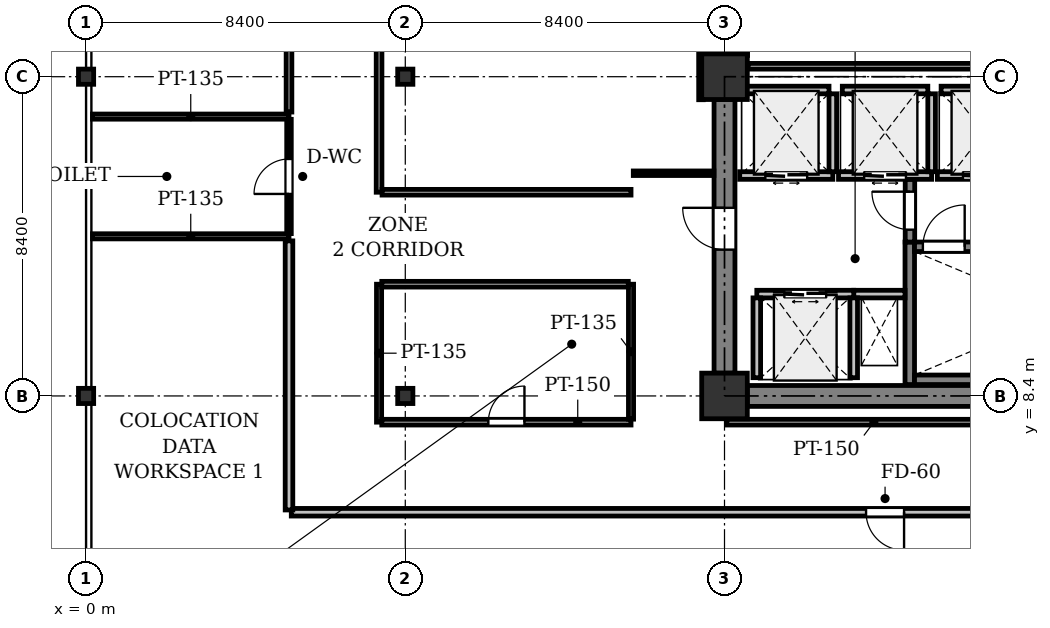
"""IFC4 building model, lengths in metres.
Left out: names, types, materials, properties, quantities, classifications, styles, units other than length and angle.
Written with IfcOpenShell. Run it as: python <this file> out.ifc"""

import sys

from ifc_helpers import new_model, si_unit, direction, frame, frame_2d, origin, origin_2d, place, context, subcontext, project, spatial, rectangle, i_section, extrude, element, fill, save


model = new_model("IFC4")
c1 = context("Model", 3, precision=1e-05, world=origin(), true_north=direction((0.0, 1.0)))
c2 = subcontext(c1, "Body", "Model", "MODEL_VIEW")
j1 = project(units=[si_unit("LENGTHUNIT", "METRE"), si_unit("PLANEANGLEUNIT", "RADIAN")], contexts=[c1])
p1 = place(None, origin())
s1 = spatial("IfcSite", under=j1, at=p1, CompositionType="ELEMENT")
p2 = place(p1, origin())
s2 = spatial("IfcBuilding", under=s1, at=p2, CompositionType="ELEMENT")
p3 = place(p2, frame((0.0, 0.0, 129.5)))
s3 = spatial("IfcBuildingStorey", under=s2, at=p3, CompositionType="ELEMENT", Elevation=129.5)
for number, where, z_axis, x_axis in (
    (1, (0.0, 8.4, 0.0), (0.0, 0.0, 1.0), (1.0, 0.0, 0.0)),
    (2, (0.0, 16.8, 0.0), (0.0, 0.0, 1.0), (1.0, 0.0, 0.0)),
    (3, (8.4, 8.4, 0.0), (0.0, 0.0, 1.0), (1.0, 0.0, 0.0)),
    (4, (8.4, 16.8, 0.0), (0.0, 0.0, 1.0), (1.0, 0.0, 0.0)),
):
    element("IfcColumn", number, at=place(p3, frame(where, z_axis=z_axis, x_axis=x_axis)), inside=s3, PredefinedType="COLUMN", context=c2, shape_type="SweptSolid", body=[
        extrude(i_section(OverallWidth=0.4, OverallDepth=0.4, WebThickness=0.025, FlangeThickness=0.04, at=origin_2d()), origin(), (0.0, 0.0, 1.0), 4.1),
    ])
for number, where, z_axis, x_axis in (
    (5, (16.8, 8.4, 0.0), (0.0, 0.0, 1.0), (1.0, 0.0, 0.0)),
    (6, (16.8, 16.8, 0.0), (0.0, 0.0, 1.0), (1.0, 0.0, 0.0)),
):
    element("IfcColumn", number, at=place(p3, frame(where, z_axis=z_axis, x_axis=x_axis)), inside=s3, PredefinedType="COLUMN", context=c2, shape_type="SweptSolid", body=[
        extrude(rectangle(XDim=1.2, YDim=1.2, at=origin_2d()), origin(), (0.0, 0.0, 1.0), 4.1),
    ])
p4 = place(p3, frame((17.4, 8.4, 0.0), z_axis=(0.0, 0.0, 1.0), x_axis=(1.0, 0.0, 0.0)))
e7 = element("IfcWall", 7, at=p4, inside=s3, PredefinedType="SHEAR", context=c2, shape_type="SweptSolid", body=[
    extrude(rectangle(XDim=7.2, YDim=0.55, at=frame_2d((3.6, 0.0))), origin(), (0.0, 0.0, 1.0), 3.825),
])
p5 = place(p3, frame((16.8, 9.0, 0.0), z_axis=(0.0, 0.0, 1.0), x_axis=(0.0, 1.0, 0.0)))
e8 = element("IfcWall", 8, at=p5, inside=s3, PredefinedType="SHEAR", context=c2, shape_type="SweptSolid", body=[
    extrude(rectangle(XDim=7.2, YDim=0.55, at=frame_2d((3.6, 0.0))), origin(), (0.0, 0.0, 1.0), 3.825),
])
p6 = place(p5, frame((3.25, 0.0, 0.0)))
e9 = element("IfcOpeningElement", 9, at=p6, cuts=e8, PredefinedType="OPENING", context=c2, shape_type="SweptSolid", body=[
    extrude(rectangle(XDim=1.1, YDim=2.15, at=frame_2d((0.55, 1.075))), frame((0.0, 0.285, 0.0), z_axis=(0.0, -1.0, 0.0), x_axis=(1.0, 0.0, 0.0)), (0.0, 0.0, 1.0), 0.57),
])
p7 = place(p3, frame((21.675, 8.7, 0.0), z_axis=(0.0, 0.0, 1.0), x_axis=(0.0, 1.0, 0.0)))
e10 = element("IfcWall", 10, at=p7, inside=s3, PredefinedType="SHEAR", context=c2, shape_type="SweptSolid", body=[
    extrude(rectangle(XDim=3.75, YDim=0.25, at=frame_2d((1.875, 0.0))), origin(), (0.0, 0.0, 1.0), 3.825),
])
p8 = place(p3, frame((21.8, 8.825, 0.0), z_axis=(0.0, 0.0, 1.0), x_axis=(1.0, 0.0, 0.0)))
e11 = element("IfcWall", 11, at=p8, inside=s3, PredefinedType="SHEAR", context=c2, shape_type="SweptSolid", body=[
    extrude(rectangle(XDim=7.75, YDim=0.25, at=frame_2d((3.875, 0.0))), origin(), (0.0, 0.0, 1.0), 3.825),
])
p9 = place(p3, frame((21.8, 12.325, 0.0), z_axis=(0.0, 0.0, 1.0), x_axis=(1.0, 0.0, 0.0)))
e12 = element("IfcWall", 12, at=p9, inside=s3, PredefinedType="SHEAR", context=c2, shape_type="SweptSolid", body=[
    extrude(rectangle(XDim=7.75, YDim=0.25, at=frame_2d((3.875, 0.0))), origin(), (0.0, 0.0, 1.0), 3.825),
])
p10 = place(p9, frame((0.22, 0.0, 0.0)))
e13 = element("IfcOpeningElement", 13, at=p10, cuts=e12, PredefinedType="OPENING", context=c2, shape_type="SweptSolid", body=[
    extrude(rectangle(XDim=1.1, YDim=2.15, at=frame_2d((0.55, 1.075))), frame((0.0, 0.135, 0.0), z_axis=(0.0, -1.0, 0.0), x_axis=(1.0, 0.0, 0.0)), (0.0, 0.0, 1.0), 0.27),
])
p11 = place(p3, frame((20.2, 11.08, 0.0), z_axis=(0.0, 0.0, 1.0), x_axis=(1.0, 0.0, 0.0)))
e14 = element("IfcWall", 14, at=p11, inside=s3, PredefinedType="PARTITIONING", context=c2, shape_type="SweptSolid", body=[
    extrude(rectangle(XDim=1.35, YDim=0.2, at=frame_2d((0.675, 0.0))), origin(), (0.0, 0.0, 1.0), 3.825),
])
p12 = place(p3, frame((21.68, 12.45, 0.0), z_axis=(0.0, 0.0, 1.0), x_axis=(0.0, 1.0, 0.0)))
e15 = element("IfcWall", 15, at=p12, inside=s3, PredefinedType="SHEAR", context=c2, shape_type="SweptSolid", body=[
    extrude(rectangle(XDim=1.65, YDim=0.25, at=frame_2d((0.825, 0.0))), origin(), (0.0, 0.0, 1.0), 3.825),
])
p13 = place(p12, frame((0.325, 0.0, 0.0)))
e16 = element("IfcOpeningElement", 16, at=p13, cuts=e15, PredefinedType="OPENING", context=c2, shape_type="SweptSolid", body=[
    extrude(rectangle(XDim=1.0, YDim=2.15, at=frame_2d((0.5, 1.075))), frame((0.0, 0.135, 0.0), z_axis=(0.0, -1.0, 0.0), x_axis=(1.0, 0.0, 0.0)), (0.0, 0.0, 1.0), 0.27),
])
p14 = place(p3, frame((17.65, 11.08, 0.0), z_axis=(0.0, 0.0, 1.0), x_axis=(1.0, 0.0, 0.0)))
e17 = element("IfcWall", 17, at=p14, inside=s3, PredefinedType="PARTITIONING", context=c2, shape_type="SweptSolid", body=[
    extrude(rectangle(XDim=2.55, YDim=0.2, at=frame_2d((1.275, 0.0))), origin(), (0.0, 0.0, 1.0), 3.825),
])
p15 = place(p14, frame((0.725, 0.0, 0.0)))
e18 = element("IfcOpeningElement", 18, at=p15, cuts=e17, PredefinedType="OPENING", context=c2, shape_type="SweptSolid", body=[
    extrude(rectangle(XDim=1.1, YDim=2.2, at=frame_2d((0.55, 1.1))), frame((0.0, 0.11, 0.0), z_axis=(0.0, -1.0, 0.0), x_axis=(1.0, 0.0, 0.0)), (0.0, 0.0, 1.0), 0.22),
])
for number, where, z_axis, x_axis in (
    (19, (20.2, 8.88, 0.0), (0.0, 0.0, 1.0), (0.0, 1.0, 0.0)),
    (20, (17.65, 8.88, 0.0), (0.0, 0.0, 1.0), (0.0, 1.0, 0.0)),
):
    element("IfcWall", number, at=place(p3, frame(where, z_axis=z_axis, x_axis=x_axis)), inside=s3, PredefinedType="PARTITIONING", context=c2, shape_type="SweptSolid", body=[
        extrude(rectangle(XDim=2.1, YDim=0.2, at=frame_2d((1.05, 0.0))), origin(), (0.0, 0.0, 1.0), 3.825),
    ])
p16 = place(p3, frame((17.2, 14.2, 0.0), z_axis=(0.0, 0.0, 1.0), x_axis=(1.0, 0.0, 0.0)))
e21 = element("IfcWall", 21, at=p16, inside=s3, PredefinedType="PARTITIONING", context=c2, shape_type="SweptSolid", body=[
    extrude(rectangle(XDim=2.45, YDim=0.2, at=frame_2d((1.225, 0.0))), origin(), (0.0, 0.0, 1.0), 3.825),
])
p17 = place(p16, frame((0.675, 0.0, 0.0)))
e22 = element("IfcOpeningElement", 22, at=p17, cuts=e21, PredefinedType="OPENING", context=c2, shape_type="SweptSolid", body=[
    extrude(rectangle(XDim=1.1, YDim=2.2, at=frame_2d((0.55, 1.1))), frame((0.0, 0.11, 0.0), z_axis=(0.0, -1.0, 0.0), x_axis=(1.0, 0.0, 0.0)), (0.0, 0.0, 1.0), 0.22),
])
p18 = place(p3, frame((19.65, 14.3, 0.0), z_axis=(0.0, 0.0, 1.0), x_axis=(0.0, 1.0, 0.0)))
e23 = element("IfcWall", 23, at=p18, inside=s3, PredefinedType="PARTITIONING", context=c2, shape_type="SweptSolid", body=[
    extrude(rectangle(XDim=2.05, YDim=0.2, at=frame_2d((1.025, 0.0))), origin(), (0.0, 0.0, 1.0), 3.825),
])
p19 = place(p3, frame((17.3, 16.45, 0.0), z_axis=(0.0, 0.0, 1.0), x_axis=(1.0, 0.0, 0.0)))
e24 = element("IfcWall", 24, at=p19, inside=s3, PredefinedType="PARTITIONING", context=c2, shape_type="SweptSolid", body=[
    extrude(rectangle(XDim=2.25, YDim=0.2, at=frame_2d((1.125, 0.0))), origin(), (0.0, 0.0, 1.0), 3.825),
])
p20 = place(p3, frame((19.8, 14.2, 0.0), z_axis=(0.0, 0.0, 1.0), x_axis=(1.0, 0.0, 0.0)))
e25 = element("IfcWall", 25, at=p20, inside=s3, PredefinedType="PARTITIONING", context=c2, shape_type="SweptSolid", body=[
    extrude(rectangle(XDim=2.45, YDim=0.2, at=frame_2d((1.225, 0.0))), origin(), (0.0, 0.0, 1.0), 3.825),
])
p21 = place(p20, frame((0.675, 0.0, 0.0)))
e26 = element("IfcOpeningElement", 26, at=p21, cuts=e25, PredefinedType="OPENING", context=c2, shape_type="SweptSolid", body=[
    extrude(rectangle(XDim=1.1, YDim=2.2, at=frame_2d((0.55, 1.1))), frame((0.0, 0.11, 0.0), z_axis=(0.0, -1.0, 0.0), x_axis=(1.0, 0.0, 0.0)), (0.0, 0.0, 1.0), 0.22),
])
p22 = place(p3, frame((22.25, 14.3, 0.0), z_axis=(0.0, 0.0, 1.0), x_axis=(0.0, 1.0, 0.0)))
e27 = element("IfcWall", 27, at=p22, inside=s3, PredefinedType="PARTITIONING", context=c2, shape_type="SweptSolid", body=[
    extrude(rectangle(XDim=2.05, YDim=0.2, at=frame_2d((1.025, 0.0))), origin(), (0.0, 0.0, 1.0), 3.825),
])
p23 = place(p3, frame((19.9, 16.45, 0.0), z_axis=(0.0, 0.0, 1.0), x_axis=(1.0, 0.0, 0.0)))
e28 = element("IfcWall", 28, at=p23, inside=s3, PredefinedType="PARTITIONING", context=c2, shape_type="SweptSolid", body=[
    extrude(rectangle(XDim=2.25, YDim=0.2, at=frame_2d((1.125, 0.0))), origin(), (0.0, 0.0, 1.0), 3.825),
])
p24 = place(p3, frame((22.4, 14.2, 0.0), z_axis=(0.0, 0.0, 1.0), x_axis=(1.0, 0.0, 0.0)))
e29 = element("IfcWall", 29, at=p24, inside=s3, PredefinedType="PARTITIONING", context=c2, shape_type="SweptSolid", body=[
    extrude(rectangle(XDim=2.45, YDim=0.2, at=frame_2d((1.225, 0.0))), origin(), (0.0, 0.0, 1.0), 3.825),
])
p25 = place(p24, frame((0.675, 0.0, 0.0)))
e30 = element("IfcOpeningElement", 30, at=p25, cuts=e29, PredefinedType="OPENING", context=c2, shape_type="SweptSolid", body=[
    extrude(rectangle(XDim=1.1, YDim=2.2, at=frame_2d((0.55, 1.1))), frame((0.0, 0.11, 0.0), z_axis=(0.0, -1.0, 0.0), x_axis=(1.0, 0.0, 0.0)), (0.0, 0.0, 1.0), 0.22),
])
p26 = place(p3, frame((22.5, 16.45, 0.0), z_axis=(0.0, 0.0, 1.0), x_axis=(1.0, 0.0, 0.0)))
e31 = element("IfcWall", 31, at=p26, inside=s3, PredefinedType="PARTITIONING", context=c2, shape_type="SweptSolid", body=[
    extrude(rectangle(XDim=2.25, YDim=0.2, at=frame_2d((1.125, 0.0))), origin(), (0.0, 0.0, 1.0), 3.825),
])
for number, where, z_axis, x_axis in (
    (32, (5.34, 15.75, 0.0), (0.0, 0.0, 1.0), (-1.0, 0.0, 0.0)),
    (33, (0.169, 12.6, 0.0), (0.0, 0.0, 1.0), (1.0, 0.0, 0.0)),
):
    element("IfcWall", number, at=place(p3, frame(where, z_axis=z_axis, x_axis=x_axis)), inside=s3, PredefinedType="PARTITIONING", context=c2, shape_type="SweptSolid", body=[
        extrude(rectangle(XDim=5.171, YDim=0.135, at=frame_2d((2.585, 0.0))), origin(), (0.0, 0.0, 1.0), 3.469),
    ])
p27 = place(p3, frame((5.34, 12.671, 0.0), z_axis=(0.0, 0.0, 1.0), x_axis=(0.0, 1.0, 0.0)))
e34 = element("IfcWall", 34, at=p27, inside=s3, PredefinedType="PARTITIONING", context=c2, shape_type="SweptSolid", body=[
    extrude(rectangle(XDim=3.007, YDim=0.12, at=frame_2d((1.503, 0.0))), origin(), (0.0, 0.0, 1.0), 3.825),
])
p28 = place(p27, frame((1.043, 0.0, 0.0)))
e35 = element("IfcOpeningElement", 35, at=p28, cuts=e34, PredefinedType="OPENING", context=c2, shape_type="SweptSolid", body=[
    extrude(rectangle(XDim=0.92, YDim=2.1, at=frame_2d((0.46, 1.05))), frame((0.0, 0.07, 0.0), z_axis=(0.0, -1.0, 0.0), x_axis=(1.0, 0.0, 0.0)), (0.0, 0.0, 1.0), 0.14),
])
p29 = place(p3, frame((16.86, 7.71, 0.0), z_axis=(0.0, 0.0, 1.0), x_axis=(1.0, 0.0, 0.0)))
e36 = element("IfcWall", 36, at=p29, inside=s3, PredefinedType="PARTITIONING", context=c2, shape_type="SweptSolid", body=[
    extrude(rectangle(XDim=7.74, YDim=0.15, at=frame_2d((3.87, 0.0))), origin(), (0.0, 0.0, 1.0), 3.297),
])
p30 = place(p3, frame((7.71, 11.34, 0.0), z_axis=(0.0, 0.0, 1.0), x_axis=(0.0, -1.0, 0.0)))
e37 = element("IfcWall", 37, at=p30, inside=s3, PredefinedType="PARTITIONING", context=c2, shape_type="SweptSolid", body=[
    extrude(rectangle(XDim=3.63, YDim=0.135, at=frame_2d((1.815, 0.0))), origin(), (0.0, 0.0, 1.0), 3.292),
])
p31 = place(p3, frame((7.781, 7.71, 0.0), z_axis=(0.0, 0.0, 1.0), x_axis=(1.0, 0.0, 0.0)))
e38 = element("IfcWall", 38, at=p31, inside=s3, PredefinedType="PARTITIONING", context=c2, shape_type="SweptSolid", body=[
    extrude(rectangle(XDim=6.559, YDim=0.15, at=frame_2d((3.279, 0.0))), origin(), (0.0, 0.0, 1.0), 3.297),
])
p32 = place(p31, frame((2.804, 0.0, 0.0)))
e39 = element("IfcOpeningElement", 39, at=p32, cuts=e38, PredefinedType="OPENING", context=c2, shape_type="SweptSolid", body=[
    extrude(rectangle(XDim=0.95, YDim=2.15, at=frame_2d((0.475, 1.075))), frame((0.0, 0.085, 0.0), z_axis=(0.0, -1.0, 0.0), x_axis=(1.0, 0.0, 0.0)), (0.0, 0.0, 1.0), 0.17),
])
p33 = place(p3, frame((14.34, 7.789, 0.0), z_axis=(0.0, 0.0, 1.0), x_axis=(0.0, 1.0, 0.0)))
e40 = element("IfcWall", 40, at=p33, inside=s3, PredefinedType="PARTITIONING", context=c2, shape_type="SweptSolid", body=[
    extrude(rectangle(XDim=3.551, YDim=0.135, at=frame_2d((1.775, 0.0))), origin(), (0.0, 0.0, 1.0), 3.292),
])
p34 = place(p3, frame((14.269, 11.34, 0.0), z_axis=(0.0, 0.0, 1.0), x_axis=(-1.0, 0.0, 0.0)))
e41 = element("IfcWall", 41, at=p34, inside=s3, PredefinedType="PARTITIONING", context=c2, shape_type="SweptSolid", body=[
    extrude(rectangle(XDim=6.487, YDim=0.15, at=frame_2d((3.244, 0.0))), origin(), (0.0, 0.0, 1.0), 3.297),
])
p35 = place(p3, frame((5.34, 15.87, 0.0), z_axis=(0.0, 0.0, 1.0), x_axis=(0.0, 1.0, 0.0)))
e42 = element("IfcWall", 42, at=p35, inside=s3, PredefinedType="PARTITIONING", context=c2, shape_type="SweptSolid", body=[
    extrude(rectangle(XDim=11.25, YDim=0.15, at=frame_2d((5.625, 0.0))), origin(), (0.0, 0.0, 1.0), 3.292),
])
p36 = place(p35, frame((5.15, 0.0, 0.0)))
e43 = element("IfcOpeningElement", 43, at=p36, cuts=e42, PredefinedType="OPENING", context=c2, shape_type="SweptSolid", body=[
    extrude(rectangle(XDim=0.95, YDim=2.15, at=frame_2d((0.475, 1.075))), frame((0.0, 0.085, 0.0), z_axis=(0.0, -1.0, 0.0), x_axis=(1.0, 0.0, 0.0)), (0.0, 0.0, 1.0), 0.17),
])
p37 = place(p3, frame((14.4, 14.26, 0.0), z_axis=(0.0, 0.0, 1.0), x_axis=(1.0, 0.0, 0.0)))
e44 = element("IfcWall", 44, at=p37, inside=s3, PredefinedType="PARTITIONING", context=c2, shape_type="SweptSolid", body=[
    extrude(rectangle(XDim=2.121, YDim=0.12, at=frame_2d((1.061, 0.0))), origin(), (0.0, 0.0, 1.0), 3.825),
])
p38 = place(p3, frame((16.181, 16.194, 0.0), z_axis=(0.0, 0.0, 1.0), x_axis=(-0.000809880277, 0.999999672047, 0.0)))
e45 = element("IfcWall", 45, at=p38, inside=s3, PredefinedType="PARTITIONING", context=c2, shape_type="SweptSolid", body=[
    extrude(rectangle(XDim=1.206, YDim=0.12, at=frame_2d((0.603, 0.0))), origin(), (0.0, 0.0, 1.0), 3.292),
])
p39 = place(p3, frame((16.2, 17.42, 0.0), z_axis=(0.0, 0.0, 1.0), x_axis=(0.999999815526, -0.000607410295, 0.0)))
e46 = element("IfcWall", 46, at=p39, inside=s3, PredefinedType="PARTITIONING", context=c2, shape_type="SweptSolid", body=[
    extrude(rectangle(XDim=1.206, YDim=0.12, at=frame_2d((0.603, 0.0))), origin(), (0.0, 0.0, 1.0), 3.297),
])
p40 = place(p3, frame((17.42, 17.075, 0.0), z_axis=(0.0, 0.0, 1.0), x_axis=(1.0, 0.0, 0.0)))
e47 = element("IfcWall", 47, at=p40, inside=s3, PredefinedType="PARTITIONING", context=c2, shape_type="SweptSolid", body=[
    extrude(rectangle(XDim=7.16, YDim=0.15, at=frame_2d((3.58, 0.0))), origin(), (0.0, 0.0, 1.0), 3.469),
])
p41 = place(p3, frame((7.71, 22.711, 0.0), z_axis=(0.0, 0.0, 1.0), x_axis=(0.0, -1.0, 0.0)))
e48 = element("IfcWall", 48, at=p41, inside=s3, PredefinedType="PARTITIONING", context=c2, shape_type="SweptSolid", body=[
    extrude(rectangle(XDim=8.951, YDim=0.15, at=frame_2d((4.476, 0.0))), origin(), (0.0, 0.0, 1.0), 3.292),
])
p42 = place(p3, frame((7.789, 13.76, 0.0), z_axis=(0.0, 0.0, 1.0), x_axis=(1.0, 0.0, 0.0)))
e49 = element("IfcWall", 49, at=p42, inside=s3, PredefinedType="PARTITIONING", context=c2, shape_type="SweptSolid", body=[
    extrude(rectangle(XDim=6.551, YDim=0.15, at=frame_2d((3.275, 0.0))), origin(), (0.0, 0.0, 1.0), 3.297),
])
p43 = place(p3, frame((36.65, 5.34, 0.0), z_axis=(0.0, 0.0, 1.0), x_axis=(-1.0, 0.0, 0.0)))
e50 = element("IfcWall", 50, at=p43, inside=s3, PredefinedType="PARTITIONING", context=c2, shape_type="SweptSolid", body=[
    extrude(rectangle(XDim=31.25, YDim=0.2, at=frame_2d((15.625, 0.0))), origin(), (0.0, 0.0, 1.0), 3.297),
])
p44 = place(p43, frame((15.125, 0.0, 0.0)))
e51 = element("IfcOpeningElement", 51, at=p44, cuts=e50, PredefinedType="OPENING", context=c2, shape_type="SweptSolid", body=[
    extrude(rectangle(XDim=1.0, YDim=2.15, at=frame_2d((0.5, 1.075))), frame((0.0, 0.11, 0.0), z_axis=(0.0, -1.0, 0.0), x_axis=(1.0, 0.0, 0.0)), (0.0, 0.0, 1.0), 0.22),
])
p45 = place(p3, frame((5.34, 5.4, 0.0), z_axis=(0.0, 0.0, 1.0), x_axis=(0.0, 1.0, 0.0)))
e52 = element("IfcWall", 52, at=p45, inside=s3, PredefinedType="PARTITIONING", context=c2, shape_type="SweptSolid", body=[
    extrude(rectangle(XDim=7.08, YDim=0.2, at=frame_2d((3.54, 0.0))), origin(), (0.0, 0.0, 1.0), 3.292),
])
p46 = place(p6, origin())
e53 = element("IfcDoor", 53, at=p46, inside=s3, OperationType="SINGLE_SWING_RIGHT", PredefinedType="DOOR", context=c2, shape_type="SweptSolid", body=[
    extrude(rectangle(XDim=1.1, YDim=2.15, at=frame_2d((0.55, 1.075))), frame((0.0, 0.025, 0.0), z_axis=(0.0, -1.0, 0.0), x_axis=(1.0, 0.0, 0.0)), (0.0, 0.0, 1.0), 0.05),
])
fill(e9, e53)
p47 = place(p10, origin())
e54 = element("IfcDoor", 54, at=p47, inside=s3, OperationType="SINGLE_SWING_RIGHT", PredefinedType="DOOR", context=c2, shape_type="SweptSolid", body=[
    extrude(rectangle(XDim=1.1, YDim=2.15, at=frame_2d((0.55, 1.075))), frame((0.0, 0.025, 0.0), z_axis=(0.0, -1.0, 0.0), x_axis=(1.0, 0.0, 0.0)), (0.0, 0.0, 1.0), 0.05),
])
fill(e13, e54)
p48 = place(p13, origin())
e55 = element("IfcDoor", 55, at=p48, inside=s3, OperationType="SINGLE_SWING_RIGHT", PredefinedType="DOOR", context=c2, shape_type="SweptSolid", body=[
    extrude(rectangle(XDim=1.0, YDim=2.15, at=frame_2d((0.5, 1.075))), frame((0.0, 0.025, 0.0), z_axis=(0.0, -1.0, 0.0), x_axis=(1.0, 0.0, 0.0)), (0.0, 0.0, 1.0), 0.05),
])
fill(e16, e55)
p49 = place(p15, origin())
e56 = element("IfcDoor", 56, at=p49, inside=s3, OperationType="DOUBLE_DOOR_SLIDING", PredefinedType="DOOR", context=c2, shape_type="SweptSolid", body=[
    extrude(rectangle(XDim=1.1, YDim=2.2, at=frame_2d((0.55, 1.1))), frame((0.0, 0.025, 0.0), z_axis=(0.0, -1.0, 0.0), x_axis=(1.0, 0.0, 0.0)), (0.0, 0.0, 1.0), 0.05),
])
fill(e18, e56)
p50 = place(p17, origin())
e57 = element("IfcDoor", 57, at=p50, inside=s3, OperationType="DOUBLE_DOOR_SLIDING", PredefinedType="DOOR", context=c2, shape_type="SweptSolid", body=[
    extrude(rectangle(XDim=1.1, YDim=2.2, at=frame_2d((0.55, 1.1))), frame((0.0, 0.025, 0.0), z_axis=(0.0, -1.0, 0.0), x_axis=(1.0, 0.0, 0.0)), (0.0, 0.0, 1.0), 0.05),
])
fill(e22, e57)
p51 = place(p21, origin())
e58 = element("IfcDoor", 58, at=p51, inside=s3, OperationType="DOUBLE_DOOR_SLIDING", PredefinedType="DOOR", context=c2, shape_type="SweptSolid", body=[
    extrude(rectangle(XDim=1.1, YDim=2.2, at=frame_2d((0.55, 1.1))), frame((0.0, 0.025, 0.0), z_axis=(0.0, -1.0, 0.0), x_axis=(1.0, 0.0, 0.0)), (0.0, 0.0, 1.0), 0.05),
])
fill(e26, e58)
p52 = place(p25, origin())
e59 = element("IfcDoor", 59, at=p52, inside=s3, OperationType="DOUBLE_DOOR_SLIDING", PredefinedType="DOOR", context=c2, shape_type="SweptSolid", body=[
    extrude(rectangle(XDim=1.1, YDim=2.2, at=frame_2d((0.55, 1.1))), frame((0.0, 0.025, 0.0), z_axis=(0.0, -1.0, 0.0), x_axis=(1.0, 0.0, 0.0)), (0.0, 0.0, 1.0), 0.05),
])
fill(e30, e59)
p53 = place(p28, origin())
e60 = element("IfcDoor", 60, at=p53, inside=s3, OperationType="SINGLE_SWING_LEFT", PredefinedType="DOOR", context=c2, shape_type="SweptSolid", body=[
    extrude(rectangle(XDim=0.92, YDim=2.1, at=frame_2d((0.46, 1.05))), frame((0.0, 0.025, 0.0), z_axis=(0.0, -1.0, 0.0), x_axis=(1.0, 0.0, 0.0)), (0.0, 0.0, 1.0), 0.05),
])
fill(e35, e60)
p54 = place(p32, origin())
e61 = element("IfcDoor", 61, at=p54, inside=s3, OperationType="SINGLE_SWING_RIGHT", PredefinedType="DOOR", context=c2, shape_type="SweptSolid", body=[
    extrude(rectangle(XDim=0.95, YDim=2.15, at=frame_2d((0.475, 1.075))), frame((0.0, 0.025, 0.0), z_axis=(0.0, -1.0, 0.0), x_axis=(1.0, 0.0, 0.0)), (0.0, 0.0, 1.0), 0.05),
])
fill(e39, e61)
p55 = place(p44, origin())
e62 = element("IfcDoor", 62, at=p55, inside=s3, OperationType="SINGLE_SWING_LEFT", PredefinedType="DOOR", context=c2, shape_type="SweptSolid", body=[
    extrude(rectangle(XDim=1.0, YDim=2.15, at=frame_2d((0.5, 1.075))), frame((0.0, 0.025, 0.0), z_axis=(0.0, -1.0, 0.0), x_axis=(1.0, 0.0, 0.0)), (0.0, 0.0, 1.0), 0.05),
])
fill(e51, e62)
save(model, sys.argv[1])
